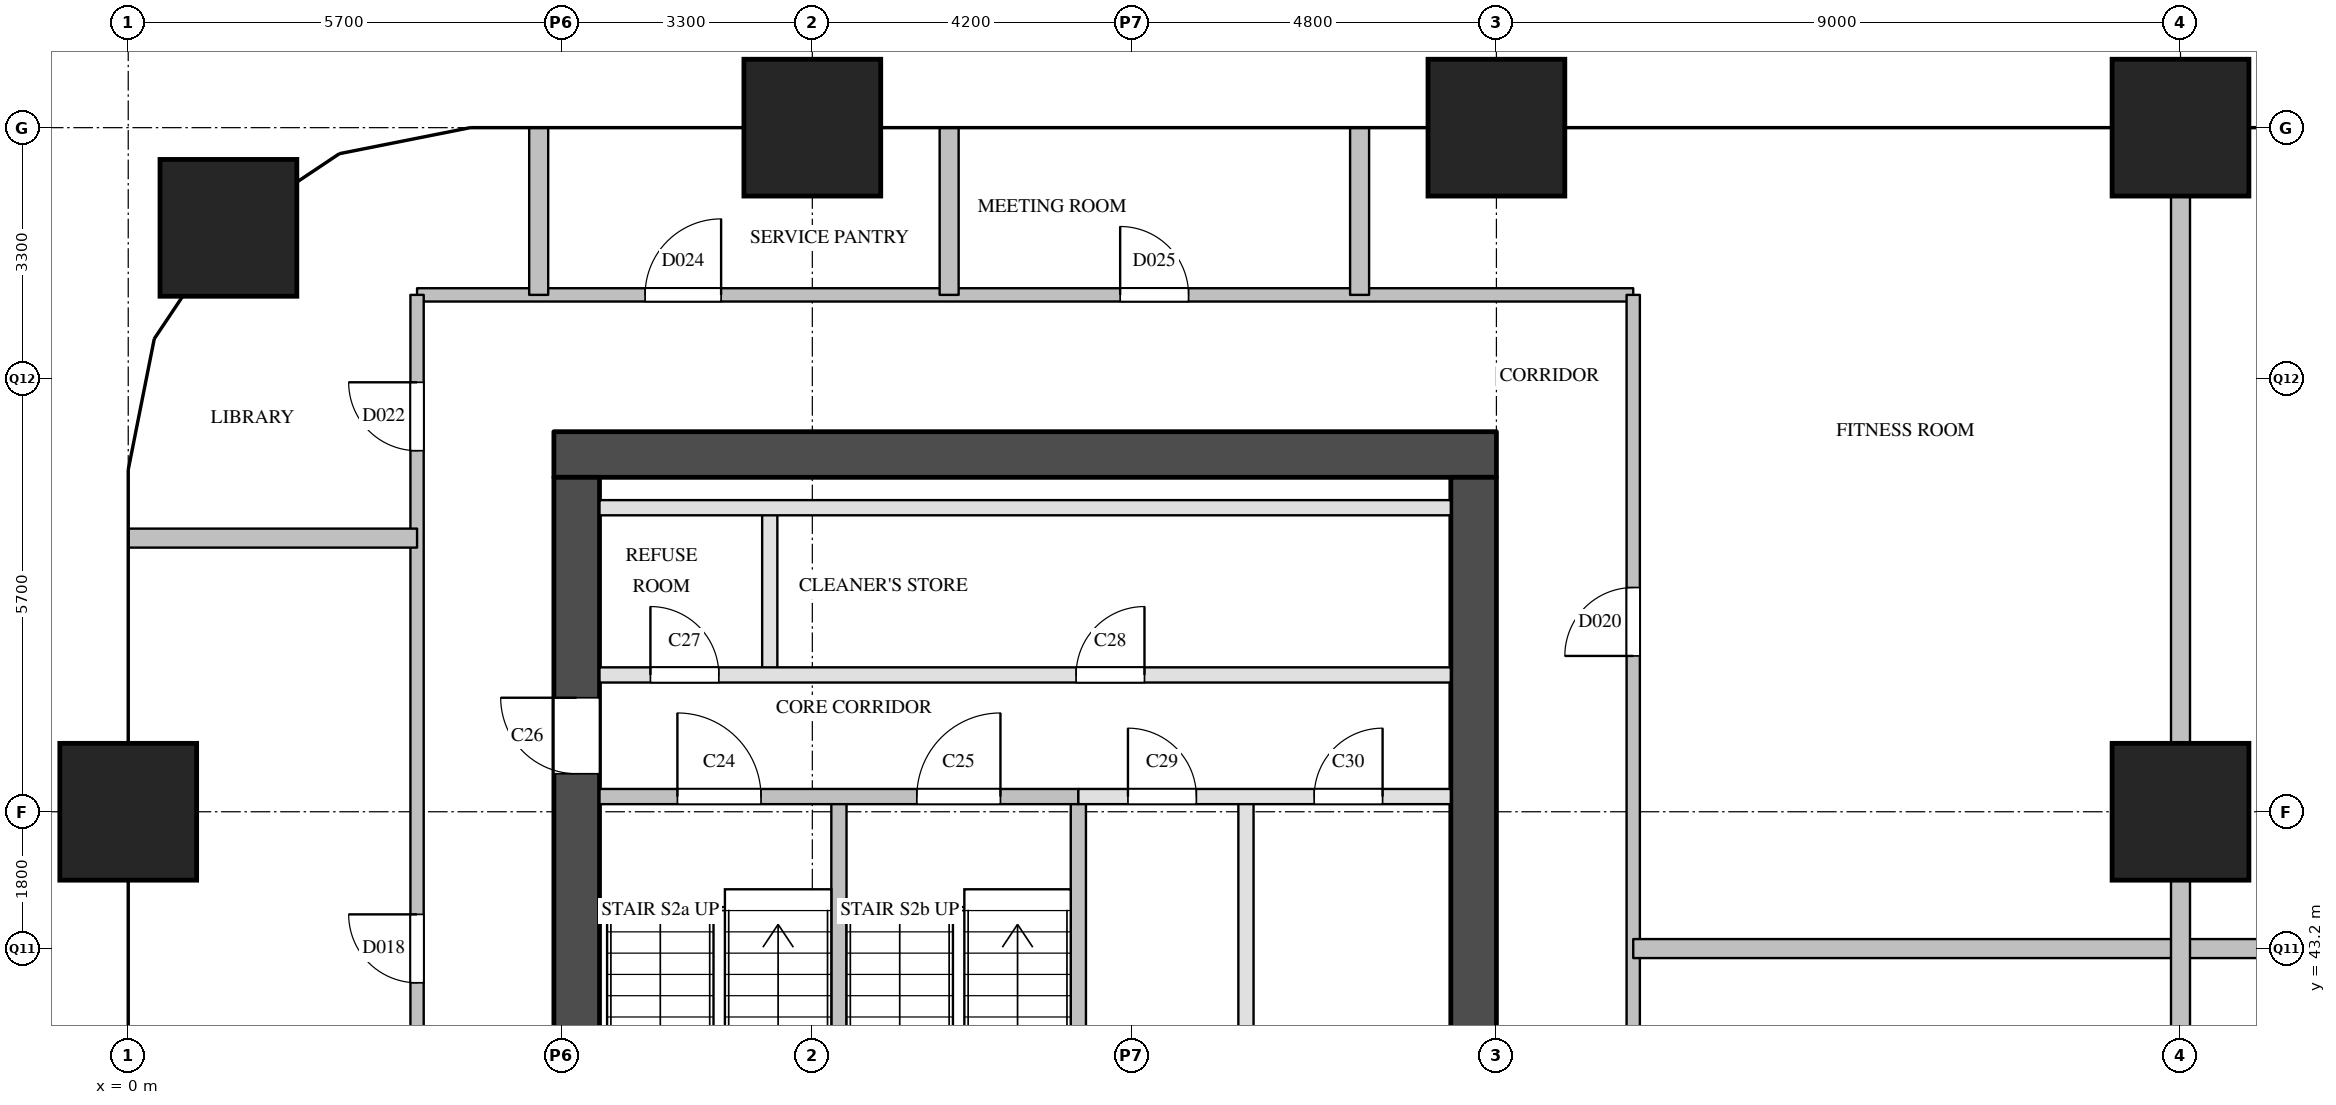
"""IFC4 building model, lengths in metres.
Left out: names, types, materials, properties, quantities, classifications, styles, units other than length and angle.
Written with IfcOpenShell. Run it as: python <this file> out.ifc"""

import sys

from ifc_helpers import new_model, si_unit, direction, frame, frame_2d, origin, origin_2d, place, context, subcontext, project, spatial, rectangle, extrude, element, fill, save


model = new_model("IFC4")
c1 = context("Model", 3, precision=1e-05, world=origin(), true_north=direction((0.0, 1.0)))
c2 = subcontext(c1, "Body", "Model", "MODEL_VIEW")
j1 = project(units=[si_unit("LENGTHUNIT", "METRE"), si_unit("PLANEANGLEUNIT", "RADIAN")], contexts=[c1])
p1 = place(None, origin())
s1 = spatial("IfcSite", under=j1, at=p1, CompositionType="ELEMENT")
p2 = place(p1, origin())
s2 = spatial("IfcBuilding", under=s1, at=p2, CompositionType="ELEMENT")
p3 = place(p2, frame((0.0, 0.0, 89.2)))
s3 = spatial("IfcBuildingStorey", under=s2, at=p3, CompositionType="ELEMENT", Elevation=89.2)
for number, where, z_axis, x_axis in (
    (1, (0.0, 45.0, 0.0), (0.0, 0.0, 1.0), (1.0, 0.0, 0.0)),
    (2, (1.318, 52.682, 0.0), (0.0, 0.0, 1.0), (1.0, 0.0, 0.0)),
    (3, (9.0, 54.0, 0.0), (0.0, 0.0, 1.0), (1.0, 0.0, 0.0)),
    (4, (18.0, 54.0, 0.0), (0.0, 0.0, 1.0), (1.0, 0.0, 0.0)),
    (5, (27.0, 45.0, 0.0), (0.0, 0.0, 1.0), (1.0, 0.0, 0.0)),
    (6, (27.0, 54.0, 0.0), (0.0, 0.0, 1.0), (1.0, 0.0, 0.0)),
):
    element("IfcColumn", number, at=place(p3, frame(where, z_axis=z_axis, x_axis=x_axis)), inside=s3, PredefinedType="COLUMN", context=c2, shape_type="SweptSolid", body=[
        extrude(rectangle(XDim=1.8, YDim=1.8, at=origin_2d()), origin(), (0.0, 0.0, 1.0), 3.8),
    ])
p4 = place(p3, frame((5.6, 49.7, 0.0), z_axis=(0.0, 0.0, 1.0), x_axis=(1.0, 0.0, 0.0)))
e7 = element("IfcWall", 7, at=p4, inside=s3, PredefinedType="SHEAR", context=c2, shape_type="SweptSolid", body=[
    extrude(rectangle(XDim=12.4, YDim=0.6, at=frame_2d((6.2, 0.0))), origin(), (0.0, 0.0, 1.0), 3.5),
])
p5 = place(p3, frame((5.9, 29.1, 0.0), z_axis=(0.0, 0.0, 1.0), x_axis=(0.0, 1.0, 0.0)))
e8 = element("IfcWall", 8, at=p5, inside=s3, PredefinedType="SHEAR", context=c2, shape_type="SweptSolid", body=[
    extrude(rectangle(XDim=20.3, YDim=0.6, at=frame_2d((10.15, 0.0))), origin(), (0.0, 0.0, 1.0), 3.5),
])
p6 = place(p5, frame((3.6, 0.0, 0.0)))
e9 = element("IfcOpeningElement", 9, at=p6, cuts=e8, PredefinedType="OPENING", context=c2, shape_type="SweptSolid", body=[
    extrude(rectangle(XDim=1.8, YDim=2.1, at=frame_2d((0.9, 1.05))), frame((0.0, 0.31, 0.0), z_axis=(0.0, -1.0, 0.0), x_axis=(1.0, 0.0, 0.0)), (0.0, 0.0, 1.0), 0.62),
])
p7 = place(p5, frame((16.4, 0.0, 0.0)))
e10 = element("IfcOpeningElement", 10, at=p7, cuts=e8, PredefinedType="OPENING", context=c2, shape_type="SweptSolid", body=[
    extrude(rectangle(XDim=1.0, YDim=2.1, at=frame_2d((0.5, 1.05))), frame((0.0, 0.31, 0.0), z_axis=(0.0, -1.0, 0.0), x_axis=(1.0, 0.0, 0.0)), (0.0, 0.0, 1.0), 0.62),
])
p8 = place(p3, frame((17.7, 29.1, 0.0), z_axis=(0.0, 0.0, 1.0), x_axis=(0.0, 1.0, 0.0)))
e11 = element("IfcWall", 11, at=p8, inside=s3, PredefinedType="SHEAR", context=c2, shape_type="SweptSolid", body=[
    extrude(rectangle(XDim=20.3, YDim=0.6, at=frame_2d((10.15, 0.0))), origin(), (0.0, 0.0, 1.0), 3.5),
])
p9 = place(p8, frame((1.25, 0.0, 0.0)))
e12 = element("IfcOpeningElement", 12, at=p9, cuts=e11, PredefinedType="OPENING", context=c2, shape_type="SweptSolid", body=[
    extrude(rectangle(XDim=0.7, YDim=2.1, at=frame_2d((0.35, 1.05))), frame((0.0, 0.31, 0.0), z_axis=(0.0, -1.0, 0.0), x_axis=(1.0, 0.0, 0.0)), (0.0, 0.0, 1.0), 0.62),
])
p10 = place(p8, frame((7.05, 0.0, 0.0)))
e13 = element("IfcOpeningElement", 13, at=p10, cuts=e11, PredefinedType="OPENING", context=c2, shape_type="SweptSolid", body=[
    extrude(rectangle(XDim=0.7, YDim=2.1, at=frame_2d((0.35, 1.05))), frame((0.0, 0.31, 0.0), z_axis=(0.0, -1.0, 0.0), x_axis=(1.0, 0.0, 0.0)), (0.0, 0.0, 1.0), 0.62),
])
p11 = place(p3, frame((8.44, 46.8, 0.0), z_axis=(0.0, 0.0, 1.0), x_axis=(0.0, 1.0, 0.0)))
e14 = element("IfcWall", 14, at=p11, inside=s3, PredefinedType="PARTITIONING", context=c2, shape_type="SweptSolid", body=[
    extrude(rectangle(XDim=2.2, YDim=0.2, at=frame_2d((1.1, 0.0))), origin(), (0.0, 0.0, 1.0), 3.5),
])
for number, where, z_axis, x_axis in (
    (15, (9.35, 40.9, 0.0), (0.0, 0.0, 1.0), (0.0, 1.0, 0.0)),
    (16, (12.5, 40.9, 0.0), (0.0, 0.0, 1.0), (0.0, 1.0, 0.0)),
):
    element("IfcWall", number, at=place(p3, frame(where, z_axis=z_axis, x_axis=x_axis)), inside=s3, PredefinedType="SOLIDWALL", context=c2, shape_type="SweptSolid", body=[
        extrude(rectangle(XDim=4.3, YDim=0.2, at=frame_2d((2.15, 0.0))), origin(), (0.0, 0.0, 1.0), 3.5),
    ])
p12 = place(p3, frame((14.705, 39.0, 0.0), z_axis=(0.0, 0.0, 1.0), x_axis=(0.0, 1.0, 0.0)))
e17 = element("IfcWall", 17, at=p12, inside=s3, PredefinedType="PARTITIONING", context=c2, shape_type="SweptSolid", body=[
    extrude(rectangle(XDim=6.2, YDim=0.2, at=frame_2d((3.1, 0.0))), origin(), (0.0, 0.0, 1.0), 3.5),
])
p13 = place(p3, frame((12.5, 45.2, 0.0), z_axis=(0.0, 0.0, 1.0), x_axis=(1.0, 0.0, 0.0)))
e18 = element("IfcWall", 18, at=p13, inside=s3, PredefinedType="PARTITIONING", context=c2, shape_type="SweptSolid", body=[
    extrude(rectangle(XDim=4.9, YDim=0.2, at=frame_2d((2.45, 0.0))), origin(), (0.0, 0.0, 1.0), 3.5),
])
p14 = place(p13, frame((0.653, 0.0, 0.0)))
e19 = element("IfcOpeningElement", 19, at=p14, cuts=e18, PredefinedType="OPENING", context=c2, shape_type="SweptSolid", body=[
    extrude(rectangle(XDim=0.9, YDim=2.1, at=frame_2d((0.45, 1.05))), frame((0.0, 0.11, 0.0), z_axis=(0.0, -1.0, 0.0), x_axis=(1.0, 0.0, 0.0)), (0.0, 0.0, 1.0), 0.22),
])
p15 = place(p13, frame((3.103, 0.0, 0.0)))
e20 = element("IfcOpeningElement", 20, at=p15, cuts=e18, PredefinedType="OPENING", context=c2, shape_type="SweptSolid", body=[
    extrude(rectangle(XDim=0.9, YDim=2.1, at=frame_2d((0.45, 1.05))), frame((0.0, 0.11, 0.0), z_axis=(0.0, -1.0, 0.0), x_axis=(1.0, 0.0, 0.0)), (0.0, 0.0, 1.0), 0.22),
])
p16 = place(p3, frame((6.2, 45.2, 0.0), z_axis=(0.0, 0.0, 1.0), x_axis=(1.0, 0.0, 0.0)))
e21 = element("IfcWall", 21, at=p16, inside=s3, PredefinedType="SOLIDWALL", context=c2, shape_type="SweptSolid", body=[
    extrude(rectangle(XDim=6.3, YDim=0.2, at=frame_2d((3.15, 0.0))), origin(), (0.0, 0.0, 1.0), 3.5),
])
p17 = place(p16, frame((1.025, 0.0, 0.0)))
e22 = element("IfcOpeningElement", 22, at=p17, cuts=e21, PredefinedType="OPENING", context=c2, shape_type="SweptSolid", body=[
    extrude(rectangle(XDim=1.1, YDim=2.1, at=frame_2d((0.55, 1.05))), frame((0.0, 0.11, 0.0), z_axis=(0.0, -1.0, 0.0), x_axis=(1.0, 0.0, 0.0)), (0.0, 0.0, 1.0), 0.22),
])
p18 = place(p16, frame((4.175, 0.0, 0.0)))
e23 = element("IfcOpeningElement", 23, at=p18, cuts=e21, PredefinedType="OPENING", context=c2, shape_type="SweptSolid", body=[
    extrude(rectangle(XDim=1.1, YDim=2.1, at=frame_2d((0.55, 1.05))), frame((0.0, 0.11, 0.0), z_axis=(0.0, -1.0, 0.0), x_axis=(1.0, 0.0, 0.0)), (0.0, 0.0, 1.0), 0.22),
])
p19 = place(p3, frame((6.2, 46.8, 0.0), z_axis=(0.0, 0.0, 1.0), x_axis=(1.0, 0.0, 0.0)))
e24 = element("IfcWall", 24, at=p19, inside=s3, PredefinedType="PARTITIONING", context=c2, shape_type="SweptSolid", body=[
    extrude(rectangle(XDim=11.2, YDim=0.2, at=frame_2d((5.6, 0.0))), origin(), (0.0, 0.0, 1.0), 3.5),
])
p20 = place(p19, frame((0.67, 0.0, 0.0)))
e25 = element("IfcOpeningElement", 25, at=p20, cuts=e24, PredefinedType="OPENING", context=c2, shape_type="SweptSolid", body=[
    extrude(rectangle(XDim=0.9, YDim=2.1, at=frame_2d((0.45, 1.05))), frame((0.0, 0.11, 0.0), z_axis=(0.0, -1.0, 0.0), x_axis=(1.0, 0.0, 0.0)), (0.0, 0.0, 1.0), 0.22),
])
p21 = place(p19, frame((6.27, 0.0, 0.0)))
e26 = element("IfcOpeningElement", 26, at=p21, cuts=e24, PredefinedType="OPENING", context=c2, shape_type="SweptSolid", body=[
    extrude(rectangle(XDim=0.9, YDim=2.1, at=frame_2d((0.45, 1.05))), frame((0.0, 0.11, 0.0), z_axis=(0.0, -1.0, 0.0), x_axis=(1.0, 0.0, 0.0)), (0.0, 0.0, 1.0), 0.22),
])
p22 = place(p3, frame((6.2, 49.0, 0.0), z_axis=(0.0, 0.0, 1.0), x_axis=(1.0, 0.0, 0.0)))
e27 = element("IfcWall", 27, at=p22, inside=s3, PredefinedType="PARTITIONING", context=c2, shape_type="SweptSolid", body=[
    extrude(rectangle(XDim=11.2, YDim=0.2, at=frame_2d((5.6, 0.0))), origin(), (0.0, 0.0, 1.0), 3.5),
])
p23 = place(p3, frame((3.8, 51.8, 0.0), z_axis=(0.0, 0.0, 1.0), x_axis=(1.0, 0.0, 0.0)))
e28 = element("IfcWall", 28, at=p23, inside=s3, PredefinedType="PARTITIONING", context=c2, shape_type="SweptSolid", body=[
    extrude(rectangle(XDim=16.0, YDim=0.175, at=frame_2d((8.0, 0.0))), origin(), (0.0, 0.0, 1.0), 3.5),
])
p24 = place(p23, frame((3.0, 0.0, 0.0)))
e29 = element("IfcOpeningElement", 29, at=p24, cuts=e28, PredefinedType="OPENING", context=c2, shape_type="SweptSolid", body=[
    extrude(rectangle(XDim=1.0, YDim=2.1, at=frame_2d((0.5, 1.05))), frame((0.0, 0.097, 0.0), z_axis=(0.0, -1.0, 0.0), x_axis=(1.0, 0.0, 0.0)), (0.0, 0.0, 1.0), 0.195),
])
p25 = place(p23, frame((9.25, 0.0, 0.0)))
e30 = element("IfcOpeningElement", 30, at=p25, cuts=e28, PredefinedType="OPENING", context=c2, shape_type="SweptSolid", body=[
    extrude(rectangle(XDim=0.9, YDim=2.1, at=frame_2d((0.45, 1.05))), frame((0.0, 0.097, 0.0), z_axis=(0.0, -1.0, 0.0), x_axis=(1.0, 0.0, 0.0)), (0.0, 0.0, 1.0), 0.195),
])
p26 = place(p3, frame((3.8, 28.5, 0.0), z_axis=(0.0, 0.0, 1.0), x_axis=(0.0, 1.0, 0.0)))
e31 = element("IfcWall", 31, at=p26, inside=s3, PredefinedType="PARTITIONING", context=c2, shape_type="SweptSolid", body=[
    extrude(rectangle(XDim=23.3, YDim=0.175, at=frame_2d((11.65, 0.0))), origin(), (0.0, 0.0, 1.0), 3.5),
])
p27 = place(p26, frame((4.2, 0.0, 0.0)))
e32 = element("IfcOpeningElement", 32, at=p27, cuts=e31, PredefinedType="OPENING", context=c2, shape_type="SweptSolid", body=[
    extrude(rectangle(XDim=0.9, YDim=2.1, at=frame_2d((0.45, 1.05))), frame((0.0, 0.097, 0.0), z_axis=(0.0, -1.0, 0.0), x_axis=(1.0, 0.0, 0.0)), (0.0, 0.0, 1.0), 0.195),
])
p28 = place(p26, frame((14.25, 0.0, 0.0)))
e33 = element("IfcOpeningElement", 33, at=p28, cuts=e31, PredefinedType="OPENING", context=c2, shape_type="SweptSolid", body=[
    extrude(rectangle(XDim=0.9, YDim=2.1, at=frame_2d((0.45, 1.05))), frame((0.0, 0.097, 0.0), z_axis=(0.0, -1.0, 0.0), x_axis=(1.0, 0.0, 0.0)), (0.0, 0.0, 1.0), 0.195),
])
p29 = place(p26, frame((21.25, 0.0, 0.0)))
e34 = element("IfcOpeningElement", 34, at=p29, cuts=e31, PredefinedType="OPENING", context=c2, shape_type="SweptSolid", body=[
    extrude(rectangle(XDim=0.9, YDim=2.1, at=frame_2d((0.45, 1.05))), frame((0.0, 0.097, 0.0), z_axis=(0.0, -1.0, 0.0), x_axis=(1.0, 0.0, 0.0)), (0.0, 0.0, 1.0), 0.195),
])
p30 = place(p3, frame((19.8, 28.5, 0.0), z_axis=(0.0, 0.0, 1.0), x_axis=(0.0, 1.0, 0.0)))
e35 = element("IfcWall", 35, at=p30, inside=s3, PredefinedType="PARTITIONING", context=c2, shape_type="SweptSolid", body=[
    extrude(rectangle(XDim=23.3, YDim=0.175, at=frame_2d((11.65, 0.0))), origin(), (0.0, 0.0, 1.0), 3.5),
])
p31 = place(p30, frame((4.2, 0.0, 0.0)))
e36 = element("IfcOpeningElement", 36, at=p31, cuts=e35, PredefinedType="OPENING", context=c2, shape_type="SweptSolid", body=[
    extrude(rectangle(XDim=0.9, YDim=2.1, at=frame_2d((0.45, 1.05))), frame((0.0, 0.097, 0.0), z_axis=(0.0, -1.0, 0.0), x_axis=(1.0, 0.0, 0.0)), (0.0, 0.0, 1.0), 0.195),
])
p32 = place(p30, frame((11.5, 0.0, 0.0)))
e37 = element("IfcOpeningElement", 37, at=p32, cuts=e35, PredefinedType="OPENING", context=c2, shape_type="SweptSolid", body=[
    extrude(rectangle(XDim=1.0, YDim=2.1, at=frame_2d((0.5, 1.05))), frame((0.0, 0.097, 0.0), z_axis=(0.0, -1.0, 0.0), x_axis=(1.0, 0.0, 0.0)), (0.0, 0.0, 1.0), 0.195),
])
p33 = place(p30, frame((18.55, 0.0, 0.0)))
e38 = element("IfcOpeningElement", 38, at=p33, cuts=e35, PredefinedType="OPENING", context=c2, shape_type="SweptSolid", body=[
    extrude(rectangle(XDim=0.9, YDim=2.1, at=frame_2d((0.45, 1.05))), frame((0.0, 0.097, 0.0), z_axis=(0.0, -1.0, 0.0), x_axis=(1.0, 0.0, 0.0)), (0.0, 0.0, 1.0), 0.195),
])
p34 = place(p3, frame((19.8, 43.2, 0.0), z_axis=(0.0, 0.0, 1.0), x_axis=(1.0, 0.0, 0.0)))
e39 = element("IfcWall", 39, at=p34, inside=s3, PredefinedType="PARTITIONING", context=c2, shape_type="SweptSolid", body=[
    extrude(rectangle(XDim=14.4, YDim=0.25, at=frame_2d((7.2, 0.0))), origin(), (0.0, 0.0, 1.0), 2.5),
])
p35 = place(p3, frame((0.0, 48.6, 0.0), z_axis=(0.0, 0.0, 1.0), x_axis=(1.0, 0.0, 0.0)))
e40 = element("IfcWall", 40, at=p35, inside=s3, PredefinedType="PARTITIONING", context=c2, shape_type="SweptSolid", body=[
    extrude(rectangle(XDim=3.8, YDim=0.25, at=frame_2d((1.9, 0.0))), origin(), (0.0, 0.0, 1.0), 2.5),
])
for number, where, z_axis, x_axis in (
    (41, (5.4, 51.8, 0.0), (0.0, 0.0, 1.0), (0.0, 1.0, 0.0)),
    (42, (10.8, 51.8, 0.0), (0.0, 0.0, 1.0), (0.0, 1.0, 0.0)),
    (43, (16.2, 51.8, 0.0), (0.0, 0.0, 1.0), (0.0, 1.0, 0.0)),
):
    element("IfcWall", number, at=place(p3, frame(where, z_axis=z_axis, x_axis=x_axis)), inside=s3, PredefinedType="PARTITIONING", context=c2, shape_type="SweptSolid", body=[
        extrude(rectangle(XDim=2.2, YDim=0.25, at=frame_2d((1.1, 0.0))), origin(), (0.0, 0.0, 1.0), 2.5),
    ])
p36 = place(p3, frame((27.0, 27.0, 0.0), z_axis=(0.0, 0.0, 1.0), x_axis=(0.0, 1.0, 0.0)))
e44 = element("IfcWall", 44, at=p36, inside=s3, PredefinedType="PARTITIONING", context=c2, shape_type="SweptSolid", body=[
    extrude(rectangle(XDim=27.0, YDim=0.25, at=frame_2d((13.5, 0.0))), origin(), (0.0, 0.0, 1.0), 2.5),
])
p37 = place(p17, origin())
e45 = element("IfcDoor", 45, at=p37, inside=s3, OperationType="SINGLE_SWING_LEFT", PredefinedType="DOOR", context=c2, shape_type="SweptSolid", body=[
    extrude(rectangle(XDim=1.1, YDim=2.1, at=frame_2d((0.55, 1.05))), frame((0.0, 0.025, 0.0), z_axis=(0.0, -1.0, 0.0), x_axis=(1.0, 0.0, 0.0)), (0.0, 0.0, 1.0), 0.05),
])
fill(e22, e45)
p38 = place(p18, origin())
e46 = element("IfcDoor", 46, at=p38, inside=s3, OperationType="SINGLE_SWING_RIGHT", PredefinedType="DOOR", context=c2, shape_type="SweptSolid", body=[
    extrude(rectangle(XDim=1.1, YDim=2.1, at=frame_2d((0.55, 1.05))), frame((0.0, 0.025, 0.0), z_axis=(0.0, -1.0, 0.0), x_axis=(1.0, 0.0, 0.0)), (0.0, 0.0, 1.0), 0.05),
])
fill(e23, e46)
p39 = place(p7, origin())
e47 = element("IfcDoor", 47, at=p39, inside=s3, OperationType="SINGLE_SWING_RIGHT", PredefinedType="DOOR", context=c2, shape_type="SweptSolid", body=[
    extrude(rectangle(XDim=1.0, YDim=2.1, at=frame_2d((0.5, 1.05))), frame((0.0, 0.025, 0.0), z_axis=(0.0, -1.0, 0.0), x_axis=(1.0, 0.0, 0.0)), (0.0, 0.0, 1.0), 0.05),
])
fill(e10, e47)
p40 = place(p20, origin())
e48 = element("IfcDoor", 48, at=p40, inside=s3, OperationType="SINGLE_SWING_LEFT", PredefinedType="DOOR", context=c2, shape_type="SweptSolid", body=[
    extrude(rectangle(XDim=0.9, YDim=2.1, at=frame_2d((0.45, 1.05))), frame((0.0, 0.025, 0.0), z_axis=(0.0, -1.0, 0.0), x_axis=(1.0, 0.0, 0.0)), (0.0, 0.0, 1.0), 0.05),
])
fill(e25, e48)
p41 = place(p21, origin())
e49 = element("IfcDoor", 49, at=p41, inside=s3, OperationType="SINGLE_SWING_RIGHT", PredefinedType="DOOR", context=c2, shape_type="SweptSolid", body=[
    extrude(rectangle(XDim=0.9, YDim=2.1, at=frame_2d((0.45, 1.05))), frame((0.0, 0.025, 0.0), z_axis=(0.0, -1.0, 0.0), x_axis=(1.0, 0.0, 0.0)), (0.0, 0.0, 1.0), 0.05),
])
fill(e26, e49)
p42 = place(p14, origin())
e50 = element("IfcDoor", 50, at=p42, inside=s3, OperationType="SINGLE_SWING_LEFT", PredefinedType="DOOR", context=c2, shape_type="SweptSolid", body=[
    extrude(rectangle(XDim=0.9, YDim=2.1, at=frame_2d((0.45, 1.05))), frame((0.0, 0.025, 0.0), z_axis=(0.0, -1.0, 0.0), x_axis=(1.0, 0.0, 0.0)), (0.0, 0.0, 1.0), 0.05),
])
fill(e19, e50)
p43 = place(p15, origin())
e51 = element("IfcDoor", 51, at=p43, inside=s3, OperationType="SINGLE_SWING_RIGHT", PredefinedType="DOOR", context=c2, shape_type="SweptSolid", body=[
    extrude(rectangle(XDim=0.9, YDim=2.1, at=frame_2d((0.45, 1.05))), frame((0.0, 0.025, 0.0), z_axis=(0.0, -1.0, 0.0), x_axis=(1.0, 0.0, 0.0)), (0.0, 0.0, 1.0), 0.05),
])
fill(e20, e51)
p44 = place(p28, origin())
e52 = element("IfcDoor", 52, at=p44, inside=s3, OperationType="SINGLE_SWING_RIGHT", PredefinedType="DOOR", context=c2, shape_type="SweptSolid", body=[
    extrude(rectangle(XDim=0.9, YDim=2.1, at=frame_2d((0.45, 1.05))), frame((0.0, 0.025, 0.0), z_axis=(0.0, -1.0, 0.0), x_axis=(1.0, 0.0, 0.0)), (0.0, 0.0, 1.0), 0.05),
])
fill(e33, e52)
p45 = place(p33, origin())
e53 = element("IfcDoor", 53, at=p45, inside=s3, OperationType="SINGLE_SWING_LEFT", PredefinedType="DOOR", context=c2, shape_type="SweptSolid", body=[
    extrude(rectangle(XDim=0.9, YDim=2.1, at=frame_2d((0.45, 1.05))), frame((0.0, 0.025, 0.0), z_axis=(0.0, -1.0, 0.0), x_axis=(1.0, 0.0, 0.0)), (0.0, 0.0, 1.0), 0.05),
])
fill(e38, e53)
p46 = place(p29, origin())
e54 = element("IfcDoor", 54, at=p46, inside=s3, OperationType="SINGLE_SWING_RIGHT", PredefinedType="DOOR", context=c2, shape_type="SweptSolid", body=[
    extrude(rectangle(XDim=0.9, YDim=2.1, at=frame_2d((0.45, 1.05))), frame((0.0, 0.025, 0.0), z_axis=(0.0, -1.0, 0.0), x_axis=(1.0, 0.0, 0.0)), (0.0, 0.0, 1.0), 0.05),
])
fill(e34, e54)
p47 = place(p24, origin())
e55 = element("IfcDoor", 55, at=p47, inside=s3, OperationType="SINGLE_SWING_RIGHT", PredefinedType="DOOR", context=c2, shape_type="SweptSolid", body=[
    extrude(rectangle(XDim=1.0, YDim=2.1, at=frame_2d((0.5, 1.05))), frame((0.0, 0.025, 0.0), z_axis=(0.0, -1.0, 0.0), x_axis=(1.0, 0.0, 0.0)), (0.0, 0.0, 1.0), 0.05),
])
fill(e29, e55)
p48 = place(p25, origin())
e56 = element("IfcDoor", 56, at=p48, inside=s3, OperationType="SINGLE_SWING_LEFT", PredefinedType="DOOR", context=c2, shape_type="SweptSolid", body=[
    extrude(rectangle(XDim=0.9, YDim=2.1, at=frame_2d((0.45, 1.05))), frame((0.0, 0.025, 0.0), z_axis=(0.0, -1.0, 0.0), x_axis=(1.0, 0.0, 0.0)), (0.0, 0.0, 1.0), 0.05),
])
fill(e30, e56)
save(model, sys.argv[1])
